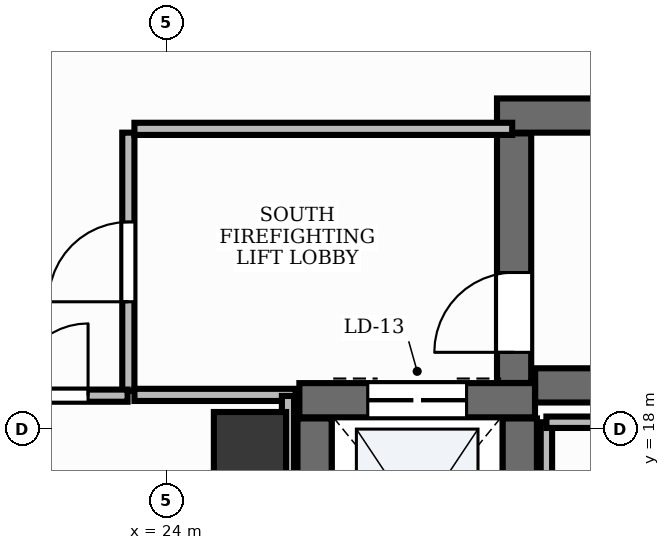
"""IFC4 building model, lengths in metres.
Left out: names, types, materials, properties, quantities, classifications, styles, units other than length and angle.
Written with IfcOpenShell. Run it as: python <this file> out.ifc"""

import sys

from ifc_helpers import new_model, si_unit, direction, frame, frame_2d, origin, origin_2d, place, context, subcontext, project, spatial, rectangle, extrude, element, fill, save


model = new_model("IFC4")
c1 = context("Model", 3, precision=1e-05, world=origin(), true_north=direction((0.0, 1.0)))
c2 = subcontext(c1, "Body", "Model", "MODEL_VIEW")
j1 = project(units=[si_unit("LENGTHUNIT", "METRE"), si_unit("PLANEANGLEUNIT", "RADIAN")], contexts=[c1])
p1 = place(None, origin())
s1 = spatial("IfcSite", under=j1, at=p1, CompositionType="ELEMENT")
p2 = place(p1, origin())
s2 = spatial("IfcBuilding", under=s1, at=p2, CompositionType="ELEMENT")
p3 = place(p2, frame((0.0, 0.0, 46.8)))
s3 = spatial("IfcBuildingStorey", under=s2, at=p3, CompositionType="ELEMENT", Elevation=46.8)
p4 = place(p3, frame((28.852, 18.575, 0.0), z_axis=(0.0, 0.0, 1.0), x_axis=(1.0, 0.0, 0.0)))
e1 = element("IfcWall", 1, at=p4, inside=s3, PredefinedType="SHEAR", context=c2, shape_type="SweptSolid", body=[
    extrude(rectangle(XDim=8.248, YDim=0.45, at=frame_2d((4.124, 0.0))), origin(), (0.0, 0.0, 1.0), 3.9),
])
p5 = place(p3, frame((28.35, 22.125, 0.0), z_axis=(0.0, 0.0, 1.0), x_axis=(1.0, 0.0, 0.0)))
e2 = element("IfcWall", 2, at=p5, inside=s3, PredefinedType="SHEAR", context=c2, shape_type="SweptSolid", body=[
    extrude(rectangle(XDim=8.75, YDim=0.45, at=frame_2d((4.375, 0.0))), origin(), (0.0, 0.0, 1.0), 3.9),
])
p6 = place(p3, frame((28.575, 18.607, 0.0), z_axis=(0.0, 0.0, 1.0), x_axis=(0.0, 1.0, 0.0)))
e3 = element("IfcWall", 3, at=p6, inside=s3, PredefinedType="SHEAR", context=c2, shape_type="SweptSolid", body=[
    extrude(rectangle(XDim=3.283, YDim=0.45, at=frame_2d((1.642, 0.0))), origin(), (0.0, 0.0, 1.0), 3.9),
])
p7 = place(p6, frame((0.403, 0.0, 0.0)))
e4 = element("IfcOpeningElement", 4, at=p7, cuts=e3, PredefinedType="OPENING", context=c2, shape_type="SweptSolid", body=[
    extrude(rectangle(XDim=1.05, YDim=2.15, at=frame_2d((0.525, 1.075))), frame((0.0, 0.24, 0.0), z_axis=(0.0, -1.0, 0.0), x_axis=(1.0, 0.0, 0.0)), (0.0, 0.0, 1.0), 0.48),
])
p8 = place(p3, frame((25.75, 18.38, 0.0), z_axis=(0.0, 0.0, 1.0), x_axis=(1.0, 0.0, 0.0)))
e5 = element("IfcWall", 5, at=p8, inside=s3, PredefinedType="SHEAR", context=c2, shape_type="SweptSolid", body=[
    extrude(rectangle(XDim=3.1, YDim=0.45, at=frame_2d((1.55, 0.0))), origin(), (0.0, 0.0, 1.0), 3.9),
])
p9 = place(p8, frame((0.9, 0.0, 0.0)))
e6 = element("IfcOpeningElement", 6, at=p9, cuts=e5, PredefinedType="OPENING", context=c2, shape_type="SweptSolid", body=[
    extrude(rectangle(XDim=1.3, YDim=2.2, at=frame_2d((0.65, 1.1))), frame((0.0, 0.24, 0.0), z_axis=(0.0, -1.0, 0.0), x_axis=(1.0, 0.0, 0.0)), (0.0, 0.0, 1.0), 0.48),
])
for number, where, z_axis, x_axis in (
    (7, (25.95, 15.44, 0.0), (0.0, 0.0, 1.0), (0.0, 1.0, 0.0)),
    (8, (28.65, 15.44, 0.0), (0.0, 0.0, 1.0), (0.0, 1.0, 0.0)),
):
    element("IfcWall", number, at=place(p3, frame(where, z_axis=z_axis, x_axis=x_axis)), inside=s3, PredefinedType="SHEAR", context=c2, shape_type="SweptSolid", body=[
        extrude(rectangle(XDim=2.7, YDim=0.45, at=frame_2d((1.35, 0.0))), origin(), (0.0, 0.0, 1.0), 3.9),
    ])
p10 = place(p3, frame((25.1, 17.75, -0.0), z_axis=(0.0, 0.0, 1.0), x_axis=(1.0, 0.0, 0.0)))
e9 = element("IfcColumn", 9, at=p10, inside=s3, PredefinedType="PILASTER", context=c2, shape_type="SweptSolid", body=[
    extrude(rectangle(XDim=0.95, YDim=0.95, at=origin_2d()), origin(), (0.0, 0.0, 1.0), 3.901),
])
p11 = place(p3, frame((23.5, 18.5, 0.0), z_axis=(0.0, 0.0, 1.0), x_axis=(0.0, 1.0, 0.0)))
e10 = element("IfcWall", 10, at=p11, inside=s3, PredefinedType="PARTITIONING", context=c2, shape_type="SweptSolid", body=[
    extrude(rectangle(XDim=3.4, YDim=0.16, at=frame_2d((1.7, 0.0))), origin(), (0.0, 0.0, 1.0), 2.91),
])
p12 = place(p11, frame((1.175, 0.0, 0.0)))
e11 = element("IfcOpeningElement", 11, at=p12, cuts=e10, PredefinedType="OPENING", context=c2, shape_type="SweptSolid", body=[
    extrude(rectangle(XDim=1.05, YDim=2.15, at=frame_2d((0.525, 1.075))), frame((0.0, 0.095, 0.0), z_axis=(0.0, -1.0, 0.0), x_axis=(1.0, 0.0, 0.0)), (0.0, 0.0, 1.0), 0.19),
])
p13 = place(p3, frame((23.58, 21.95, 0.0), z_axis=(0.0, 0.0, 1.0), x_axis=(1.0, 0.0, 0.0)))
e12 = element("IfcWall", 12, at=p13, inside=s3, PredefinedType="PARTITIONING", context=c2, shape_type="SweptSolid", body=[
    extrude(rectangle(XDim=4.97, YDim=0.16, at=frame_2d((2.485, 0.0))), origin(), (0.0, 0.0, 1.0), 2.91),
])
p14 = place(p3, frame((23.58, 18.45, 0.0), z_axis=(0.0, 0.0, 1.0), x_axis=(1.0, 0.0, 0.0)))
e13 = element("IfcWall", 13, at=p14, inside=s3, PredefinedType="PARTITIONING", context=c2, shape_type="SweptSolid", body=[
    extrude(rectangle(XDim=2.12, YDim=0.16, at=frame_2d((1.06, 0.0))), origin(), (0.0, 0.0, 1.0), 2.91),
])
p15 = place(p3, frame((20.623, 18.44, 0.0), z_axis=(0.0, 0.0, 1.0), x_axis=(1.0, 0.0, 0.0)))
e14 = element("IfcWall", 14, at=p15, inside=s3, PredefinedType="PARTITIONING", context=c2, shape_type="SweptSolid", body=[
    extrude(rectangle(XDim=2.867, YDim=0.16, at=frame_2d((1.434, 0.0))), origin(), (0.0, 0.0, 1.0), 2.91),
])
p16 = place(p15, frame((1.397, 0.0, 0.0)))
e15 = element("IfcOpeningElement", 15, at=p16, cuts=e14, PredefinedType="OPENING", context=c2, shape_type="SweptSolid", body=[
    extrude(rectangle(XDim=0.95, YDim=2.15, at=frame_2d((0.475, 1.075))), frame((0.0, 0.095, 0.0), z_axis=(0.0, -1.0, 0.0), x_axis=(1.0, 0.0, 0.0)), (0.0, 0.0, 1.0), 0.19),
])
p17 = place(p3, frame((25.6, 18.436, 0.0), z_axis=(0.0, 0.0, 1.0), x_axis=(0.0, -1.0, 0.0)))
e16 = element("IfcWall", 16, at=p17, inside=s3, PredefinedType="PARTITIONING", context=c2, shape_type="SweptSolid", body=[
    extrude(rectangle(XDim=3.482, YDim=0.16, at=frame_2d((1.741, 0.0))), origin(), (0.0, 0.0, 1.0), 2.91),
])
p18 = place(p3, frame((29.0, 14.954, 0.0), z_axis=(0.0, 0.0, 1.0), x_axis=(0.0, 1.0, 0.0)))
e17 = element("IfcWall", 17, at=p18, inside=s3, PredefinedType="PARTITIONING", context=c2, shape_type="SweptSolid", body=[
    extrude(rectangle(XDim=3.136, YDim=0.15, at=frame_2d((1.568, 0.0))), origin(), (0.0, 0.0, 1.0), 2.91),
])
p19 = place(p3, frame((29.0, 18.09, 0.0), z_axis=(0.0, 0.0, 1.0), x_axis=(1.0, 0.0, 0.0)))
e18 = element("IfcWall", 18, at=p19, inside=s3, PredefinedType="PARTITIONING", context=c2, shape_type="SweptSolid", body=[
    extrude(rectangle(XDim=8.35, YDim=0.15, at=frame_2d((4.175, 0.0))), origin(), (0.0, 0.0, 1.0), 2.91),
])
p20 = place(p7, origin())
e19 = element("IfcDoor", 19, at=p20, inside=s3, OperationType="SINGLE_SWING_LEFT", PredefinedType="DOOR", context=c2, shape_type="SweptSolid", body=[
    extrude(rectangle(XDim=1.05, YDim=2.15, at=frame_2d((0.525, 1.075))), frame((0.0, 0.025, 0.0), z_axis=(0.0, -1.0, 0.0), x_axis=(1.0, 0.0, 0.0)), (0.0, 0.0, 1.0), 0.05),
])
fill(e4, e19)
p21 = place(p9, origin())
e20 = element("IfcDoor", 20, at=p21, inside=s3, OperationType="DOUBLE_DOOR_SLIDING", PredefinedType="DOOR", context=c2, shape_type="SweptSolid", body=[
    extrude(rectangle(XDim=1.3, YDim=2.2, at=frame_2d((0.65, 1.1))), frame((0.0, 0.025, 0.0), z_axis=(0.0, -1.0, 0.0), x_axis=(1.0, 0.0, 0.0)), (0.0, 0.0, 1.0), 0.05),
])
fill(e6, e20)
p22 = place(p12, origin())
e21 = element("IfcDoor", 21, at=p22, inside=s3, OperationType="SINGLE_SWING_LEFT", PredefinedType="DOOR", context=c2, shape_type="SweptSolid", body=[
    extrude(rectangle(XDim=1.05, YDim=2.15, at=frame_2d((0.525, 1.075))), frame((0.0, 0.025, 0.0), z_axis=(0.0, -1.0, 0.0), x_axis=(1.0, 0.0, 0.0)), (0.0, 0.0, 1.0), 0.05),
])
fill(e11, e21)
p23 = place(p16, origin())
e22 = element("IfcDoor", 22, at=p23, inside=s3, OperationType="SINGLE_SWING_RIGHT", PredefinedType="DOOR", context=c2, shape_type="SweptSolid", body=[
    extrude(rectangle(XDim=0.95, YDim=2.15, at=frame_2d((0.475, 1.075))), frame((0.0, 0.025, 0.0), z_axis=(0.0, -1.0, 0.0), x_axis=(1.0, 0.0, 0.0)), (0.0, 0.0, 1.0), 0.05),
])
fill(e15, e22)
save(model, sys.argv[1])
